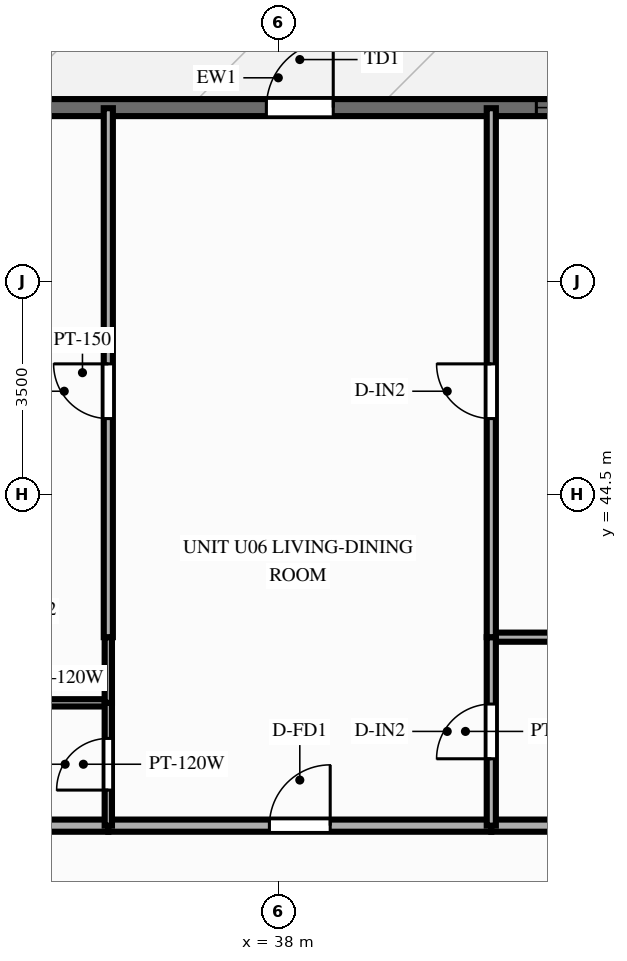
"""IFC4 building model, lengths in metres.
Left out: names, types, materials, properties, quantities, classifications, styles, units other than length and angle.
Written with IfcOpenShell. Run it as: python <this file> out.ifc"""

import sys

from ifc_helpers import new_model, si_unit, direction, frame, frame_2d, origin, place, context, subcontext, project, spatial, rectangle, extrude, source, transform, mapped, element, fill, save


model = new_model("IFC4")
c1 = context("Model", 3, precision=1e-05, world=origin(), true_north=direction((0.0, 1.0)))
c2 = subcontext(c1, "Body", "Model", "MODEL_VIEW")
j1 = project(units=[si_unit("LENGTHUNIT", "METRE"), si_unit("PLANEANGLEUNIT", "RADIAN")], contexts=[c1])
p1 = place(None, origin())
s1 = spatial("IfcSite", under=j1, at=p1, CompositionType="ELEMENT")
p2 = place(p1, origin())
s2 = spatial("IfcBuilding", under=s1, at=p2, CompositionType="ELEMENT")
p3 = place(p2, frame((0.0, 0.0, 77.85)))
s3 = spatial("IfcBuildingStorey", under=s2, at=p3, CompositionType="ELEMENT", Elevation=77.85)
p4 = place(p3, frame((16.2, 50.86, 0.0), z_axis=(0.0, 0.0, 1.0), x_axis=(1.0, 0.0, 0.0)))
e1 = element("IfcWall", 1, at=p4, inside=s3, PredefinedType="SOLIDWALL", context=c2, shape_type="SweptSolid", body=[
    extrude(rectangle(XDim=43.6, YDim=0.28, at=frame_2d((21.8, 0.0))), origin(), (0.0, 0.0, 1.0), 2.28),
])
p5 = place(p4, frame((0.722, 0.0, 0.25)))
e2 = element("IfcOpeningElement", 2, at=p5, cuts=e1, PredefinedType="OPENING", context=c2, shape_type="SweptSolid", body=[
    extrude(rectangle(XDim=1.2, YDim=1.5, at=frame_2d((0.6, 0.75))), frame((0.0, 0.152, 0.0), z_axis=(0.0, -1.0, 0.0), x_axis=(1.0, 0.0, 0.0)), (0.0, 0.0, 1.0), 0.304),
])
p6 = place(p4, frame((3.105, 0.0, 0.25)))
e3 = element("IfcOpeningElement", 3, at=p6, cuts=e1, PredefinedType="OPENING", context=c2, shape_type="SweptSolid", body=[
    extrude(rectangle(XDim=1.2, YDim=1.5, at=frame_2d((0.6, 0.75))), frame((0.0, 0.152, 0.0), z_axis=(0.0, -1.0, 0.0), x_axis=(1.0, 0.0, 0.0)), (0.0, 0.0, 1.0), 0.304),
])
p7 = place(p4, frame((7.812, 0.0, 0.25)))
e4 = element("IfcOpeningElement", 4, at=p7, cuts=e1, PredefinedType="OPENING", context=c2, shape_type="SweptSolid", body=[
    extrude(rectangle(XDim=1.2, YDim=1.5, at=frame_2d((0.6, 0.75))), frame((0.0, 0.152, 0.0), z_axis=(0.0, -1.0, 0.0), x_axis=(1.0, 0.0, 0.0)), (0.0, 0.0, 1.0), 0.304),
])
p8 = place(p4, frame((12.764, 0.0, 0.25)))
e5 = element("IfcOpeningElement", 5, at=p8, cuts=e1, PredefinedType="OPENING", context=c2, shape_type="SweptSolid", body=[
    extrude(rectangle(XDim=1.2, YDim=1.5, at=frame_2d((0.6, 0.75))), frame((0.0, 0.152, 0.0), z_axis=(0.0, -1.0, 0.0), x_axis=(1.0, 0.0, 0.0)), (0.0, 0.0, 1.0), 0.304),
])
p9 = place(p4, frame((16.71, 0.0, 0.25)))
e6 = element("IfcOpeningElement", 6, at=p9, cuts=e1, PredefinedType="OPENING", context=c2, shape_type="SweptSolid", body=[
    extrude(rectangle(XDim=1.2, YDim=1.5, at=frame_2d((0.6, 0.75))), frame((0.0, 0.152, 0.0), z_axis=(0.0, -1.0, 0.0), x_axis=(1.0, 0.0, 0.0)), (0.0, 0.0, 1.0), 0.304),
])
p10 = place(p4, frame((21.604, 0.0, 0.0)))
e7 = element("IfcOpeningElement", 7, at=p10, cuts=e1, PredefinedType="OPENING", context=c2, shape_type="SweptSolid", body=[
    extrude(rectangle(XDim=1.1, YDim=2.15, at=frame_2d((0.55, 1.075))), frame((0.0, 0.152, 0.0), z_axis=(0.0, -1.0, 0.0), x_axis=(1.0, 0.0, 0.0)), (0.0, 0.0, 1.0), 0.304),
])
p11 = place(p4, frame((26.044, 0.0, 0.25)))
e8 = element("IfcOpeningElement", 8, at=p11, cuts=e1, PredefinedType="OPENING", context=c2, shape_type="SweptSolid", body=[
    extrude(rectangle(XDim=1.2, YDim=1.5, at=frame_2d((0.6, 0.75))), frame((0.0, 0.152, 0.0), z_axis=(0.0, -1.0, 0.0), x_axis=(1.0, 0.0, 0.0)), (0.0, 0.0, 1.0), 0.304),
])
p12 = place(p4, frame((30.306, 0.0, 0.25)))
e9 = element("IfcOpeningElement", 9, at=p12, cuts=e1, PredefinedType="OPENING", context=c2, shape_type="SweptSolid", body=[
    extrude(rectangle(XDim=1.2, YDim=1.5, at=frame_2d((0.6, 0.75))), frame((0.0, 0.152, 0.0), z_axis=(0.0, -1.0, 0.0), x_axis=(1.0, 0.0, 0.0)), (0.0, 0.0, 1.0), 0.304),
])
p13 = place(p4, frame((35.629, 0.0, 0.25)))
e10 = element("IfcOpeningElement", 10, at=p13, cuts=e1, PredefinedType="OPENING", context=c2, shape_type="SweptSolid", body=[
    extrude(rectangle(XDim=1.2, YDim=1.5, at=frame_2d((0.6, 0.75))), frame((0.0, 0.152, 0.0), z_axis=(0.0, -1.0, 0.0), x_axis=(1.0, 0.0, 0.0)), (0.0, 0.0, 1.0), 0.304),
])
p14 = place(p4, frame((40.885, 0.0, 0.25)))
e11 = element("IfcOpeningElement", 11, at=p14, cuts=e1, PredefinedType="OPENING", context=c2, shape_type="SweptSolid", body=[
    extrude(rectangle(XDim=1.2, YDim=1.5, at=frame_2d((0.6, 0.75))), frame((0.0, 0.152, 0.0), z_axis=(0.0, -1.0, 0.0), x_axis=(1.0, 0.0, 0.0)), (0.0, 0.0, 1.0), 0.304),
])
p15 = place(p3, frame((31.679, 39.05, 0.0), z_axis=(0.0, 0.0, 1.0), x_axis=(1.0, 0.0, 0.0)))
e12 = element("IfcWall", 12, at=p15, inside=s3, PredefinedType="PARTITIONING", context=c2, shape_type="SweptSolid", body=[
    extrude(rectangle(XDim=3.526, YDim=0.2, at=frame_2d((1.763, 0.0))), origin(), (0.0, 0.0, 1.0), 2.79),
])
p16 = place(p3, frame((35.204, 39.05, 0.0), z_axis=(0.0, 0.0, 1.0), x_axis=(1.0, 0.0, 0.0)))
e13 = element("IfcWall", 13, at=p16, inside=s3, PredefinedType="PARTITIONING", context=c2, shape_type="SweptSolid", body=[
    extrude(rectangle(XDim=6.299, YDim=0.2, at=frame_2d((3.149, 0.0))), origin(), (0.0, 0.0, 1.0), 2.79),
])
p17 = place(p16, frame((2.649, 0.0, 0.0)))
e14 = element("IfcOpeningElement", 14, at=p17, cuts=e13, PredefinedType="OPENING", context=c2, shape_type="SweptSolid", body=[
    extrude(rectangle(XDim=1.0, YDim=2.15, at=frame_2d((0.5, 1.075))), frame((0.0, 0.112, 0.0), z_axis=(0.0, -1.0, 0.0), x_axis=(1.0, 0.0, 0.0)), (0.0, 0.0, 1.0), 0.224),
])
p18 = place(p3, frame((41.503, 39.05, 0.0), z_axis=(0.0, 0.0, 1.0), x_axis=(1.0, 0.0, 0.0)))
e15 = element("IfcWall", 15, at=p18, inside=s3, PredefinedType="PARTITIONING", context=c2, shape_type="SweptSolid", body=[
    extrude(rectangle(XDim=3.736, YDim=0.2, at=frame_2d((1.868, 0.0))), origin(), (0.0, 0.0, 1.0), 2.79),
])
p19 = place(p3, frame((31.679, 41.07, 0.0), z_axis=(0.0, 0.0, 1.0), x_axis=(1.0, 0.0, 0.0)))
e16 = element("IfcWall", 16, at=p19, inside=s3, PredefinedType="PARTITIONING", context=c2, shape_type="SweptSolid", body=[
    extrude(rectangle(XDim=3.526, YDim=0.12, at=frame_2d((1.763, 0.0))), origin(), (0.0, 0.0, 1.0), 2.79),
])
p20 = place(p3, frame((41.503, 42.15, 0.0), z_axis=(0.0, 0.0, 1.0), x_axis=(1.0, 0.0, 0.0)))
e17 = element("IfcWall", 17, at=p20, inside=s3, PredefinedType="PARTITIONING", context=c2, shape_type="SweptSolid", body=[
    extrude(rectangle(XDim=3.736, YDim=0.15, at=frame_2d((1.868, 0.0))), origin(), (0.0, 0.0, 1.0), 2.79),
])
p21 = place(p3, frame((35.204, 39.05, 0.0), z_axis=(0.0, 0.0, 1.0), x_axis=(0.0, 1.0, 0.0)))
e18 = element("IfcWall", 18, at=p21, inside=s3, PredefinedType="PARTITIONING", context=c2, shape_type="SweptSolid", body=[
    extrude(rectangle(XDim=2.02, YDim=0.12, at=frame_2d((1.01, 0.0))), origin(), (0.0, 0.0, 1.0), 2.79),
])
p22 = place(p21, frame((0.585, 0.0, 0.0)))
e19 = element("IfcOpeningElement", 19, at=p22, cuts=e18, PredefinedType="OPENING", context=c2, shape_type="SweptSolid", body=[
    extrude(rectangle(XDim=0.85, YDim=2.05, at=frame_2d((0.425, 1.025))), frame((0.0, 0.072, 0.0), z_axis=(0.0, -1.0, 0.0), x_axis=(1.0, 0.0, 0.0)), (0.0, 0.0, 1.0), 0.144),
])
p23 = place(p3, frame((35.204, 41.07, 0.0), z_axis=(0.0, 0.0, 1.0), x_axis=(0.0, 1.0, 0.0)))
e20 = element("IfcWall", 20, at=p23, inside=s3, PredefinedType="PARTITIONING", context=c2, shape_type="SweptSolid", body=[
    extrude(rectangle(XDim=1.08, YDim=0.12, at=frame_2d((0.54, 0.0))), origin(), (0.0, 0.0, 1.0), 2.79),
])
p24 = place(p3, frame((35.204, 42.15, 0.0), z_axis=(0.0, 0.0, 1.0), x_axis=(0.0, 1.0, 0.0)))
e21 = element("IfcWall", 21, at=p24, inside=s3, PredefinedType="PARTITIONING", context=c2, shape_type="SweptSolid", body=[
    extrude(rectangle(XDim=8.7, YDim=0.15, at=frame_2d((4.35, 0.0))), origin(), (0.0, 0.0, 1.0), 2.79),
])
p25 = place(p24, frame((3.595, 0.0, 0.0)))
e22 = element("IfcOpeningElement", 22, at=p25, cuts=e21, PredefinedType="OPENING", context=c2, shape_type="SweptSolid", body=[
    extrude(rectangle(XDim=0.9, YDim=2.1, at=frame_2d((0.45, 1.05))), frame((0.0, 0.087, 0.0), z_axis=(0.0, -1.0, 0.0), x_axis=(1.0, 0.0, 0.0)), (0.0, 0.0, 1.0), 0.174),
])
p26 = place(p3, frame((41.503, 39.05, 0.0), z_axis=(0.0, 0.0, 1.0), x_axis=(0.0, 1.0, 0.0)))
e23 = element("IfcWall", 23, at=p26, inside=s3, PredefinedType="PARTITIONING", context=c2, shape_type="SweptSolid", body=[
    extrude(rectangle(XDim=3.1, YDim=0.15, at=frame_2d((1.55, 0.0))), origin(), (0.0, 0.0, 1.0), 2.79),
])
p27 = place(p26, frame((1.1, 0.0, 0.0)))
e24 = element("IfcOpeningElement", 24, at=p27, cuts=e23, PredefinedType="OPENING", context=c2, shape_type="SweptSolid", body=[
    extrude(rectangle(XDim=0.9, YDim=2.1, at=frame_2d((0.45, 1.05))), frame((0.0, 0.087, 0.0), z_axis=(0.0, -1.0, 0.0), x_axis=(1.0, 0.0, 0.0)), (0.0, 0.0, 1.0), 0.174),
])
p28 = place(p3, frame((41.503, 42.15, 0.0), z_axis=(0.0, 0.0, 1.0), x_axis=(0.0, 1.0, 0.0)))
e25 = element("IfcWall", 25, at=p28, inside=s3, PredefinedType="PARTITIONING", context=c2, shape_type="SweptSolid", body=[
    extrude(rectangle(XDim=8.7, YDim=0.15, at=frame_2d((4.35, 0.0))), origin(), (0.0, 0.0, 1.0), 2.79),
])
p29 = place(p28, frame((3.595, 0.0, 0.0)))
e26 = element("IfcOpeningElement", 26, at=p29, cuts=e25, PredefinedType="OPENING", context=c2, shape_type="SweptSolid", body=[
    extrude(rectangle(XDim=0.9, YDim=2.1, at=frame_2d((0.45, 1.05))), frame((0.0, 0.087, 0.0), z_axis=(0.0, -1.0, 0.0), x_axis=(1.0, 0.0, 0.0)), (0.0, 0.0, 1.0), 0.174),
])
m1 = source(origin(), c2, "Body", "SweptSolid", [
    extrude(rectangle(XDim=1.1, YDim=2.15, at=frame_2d((0.55, 1.075))), frame((0.0, 0.025, 0.0), z_axis=(0.0, -1.0, 0.0), x_axis=(1.0, 0.0, 0.0)), (0.0, 0.0, 1.0), 0.05),
])
p30 = place(p10, origin())
e27 = element("IfcDoor", 27, at=p30, inside=s3, OperationType="SINGLE_SWING_RIGHT", PredefinedType="DOOR", context=c2, shape_type="MappedRepresentation", body=[
    mapped(m1, transform((0.0, 0.0, 0.0), scale=1.0)),
])
fill(e7, e27)
m2 = source(origin(), c2, "Body", "SweptSolid", [
    extrude(rectangle(XDim=1.2, YDim=1.5, at=frame_2d((0.6, 0.75))), frame((0.0, 0.03, 0.0), z_axis=(0.0, -1.0, 0.0), x_axis=(1.0, 0.0, 0.0)), (0.0, 0.0, 1.0), 0.06),
])
p31 = place(p11, origin())
e28 = element("IfcWindow", 28, at=p31, inside=s3, PartitioningType="SINGLE_PANEL", PredefinedType="WINDOW", context=c2, shape_type="MappedRepresentation", body=[
    mapped(m2, transform((0.0, 0.0, 0.0), scale=1.0)),
])
fill(e8, e28)
m3 = source(origin(), c2, "Body", "SweptSolid", [
    extrude(rectangle(XDim=1.0, YDim=2.15, at=frame_2d((0.5, 1.075))), frame((0.0, 0.025, 0.0), z_axis=(0.0, -1.0, 0.0), x_axis=(1.0, 0.0, 0.0)), (0.0, 0.0, 1.0), 0.05),
])
p32 = place(p17, origin())
e29 = element("IfcDoor", 29, at=p32, inside=s3, OperationType="SINGLE_SWING_RIGHT", PredefinedType="DOOR", context=c2, shape_type="MappedRepresentation", body=[
    mapped(m3, transform((0.0, 0.0, 0.0), scale=1.0)),
])
fill(e14, e29)
m4 = source(origin(), c2, "Body", "SweptSolid", [
    extrude(rectangle(XDim=0.85, YDim=2.05, at=frame_2d((0.425, 1.025))), frame((0.0, 0.025, 0.0), z_axis=(0.0, -1.0, 0.0), x_axis=(1.0, 0.0, 0.0)), (0.0, 0.0, 1.0), 0.05),
])
p33 = place(p22, origin())
e30 = element("IfcDoor", 30, at=p33, inside=s3, OperationType="SINGLE_SWING_LEFT", PredefinedType="DOOR", context=c2, shape_type="MappedRepresentation", body=[
    mapped(m4, transform((0.0, 0.0, 0.0), scale=1.0)),
])
fill(e19, e30)
m5 = source(origin(), c2, "Body", "SweptSolid", [
    extrude(rectangle(XDim=0.9, YDim=2.1, at=frame_2d((0.45, 1.05))), frame((0.0, 0.025, 0.0), z_axis=(0.0, -1.0, 0.0), x_axis=(1.0, 0.0, 0.0)), (0.0, 0.0, 1.0), 0.05),
])
p34 = place(p25, origin())
e31 = element("IfcDoor", 31, at=p34, inside=s3, OperationType="SINGLE_SWING_RIGHT", PredefinedType="DOOR", context=c2, shape_type="MappedRepresentation", body=[
    mapped(m5, transform((0.0, 0.0, 0.0), scale=1.0)),
])
fill(e22, e31)
p35 = place(p27, origin())
e32 = element("IfcDoor", 32, at=p35, inside=s3, OperationType="SINGLE_SWING_LEFT", PredefinedType="DOOR", context=c2, shape_type="MappedRepresentation", body=[
    mapped(m5, transform((0.0, 0.0, 0.0), scale=1.0)),
])
fill(e24, e32)
p36 = place(p29, origin())
e33 = element("IfcDoor", 33, at=p36, inside=s3, OperationType="SINGLE_SWING_RIGHT", PredefinedType="DOOR", context=c2, shape_type="MappedRepresentation", body=[
    mapped(m5, transform((0.0, 0.0, 0.0), scale=1.0)),
])
fill(e26, e33)
save(model, sys.argv[1])
